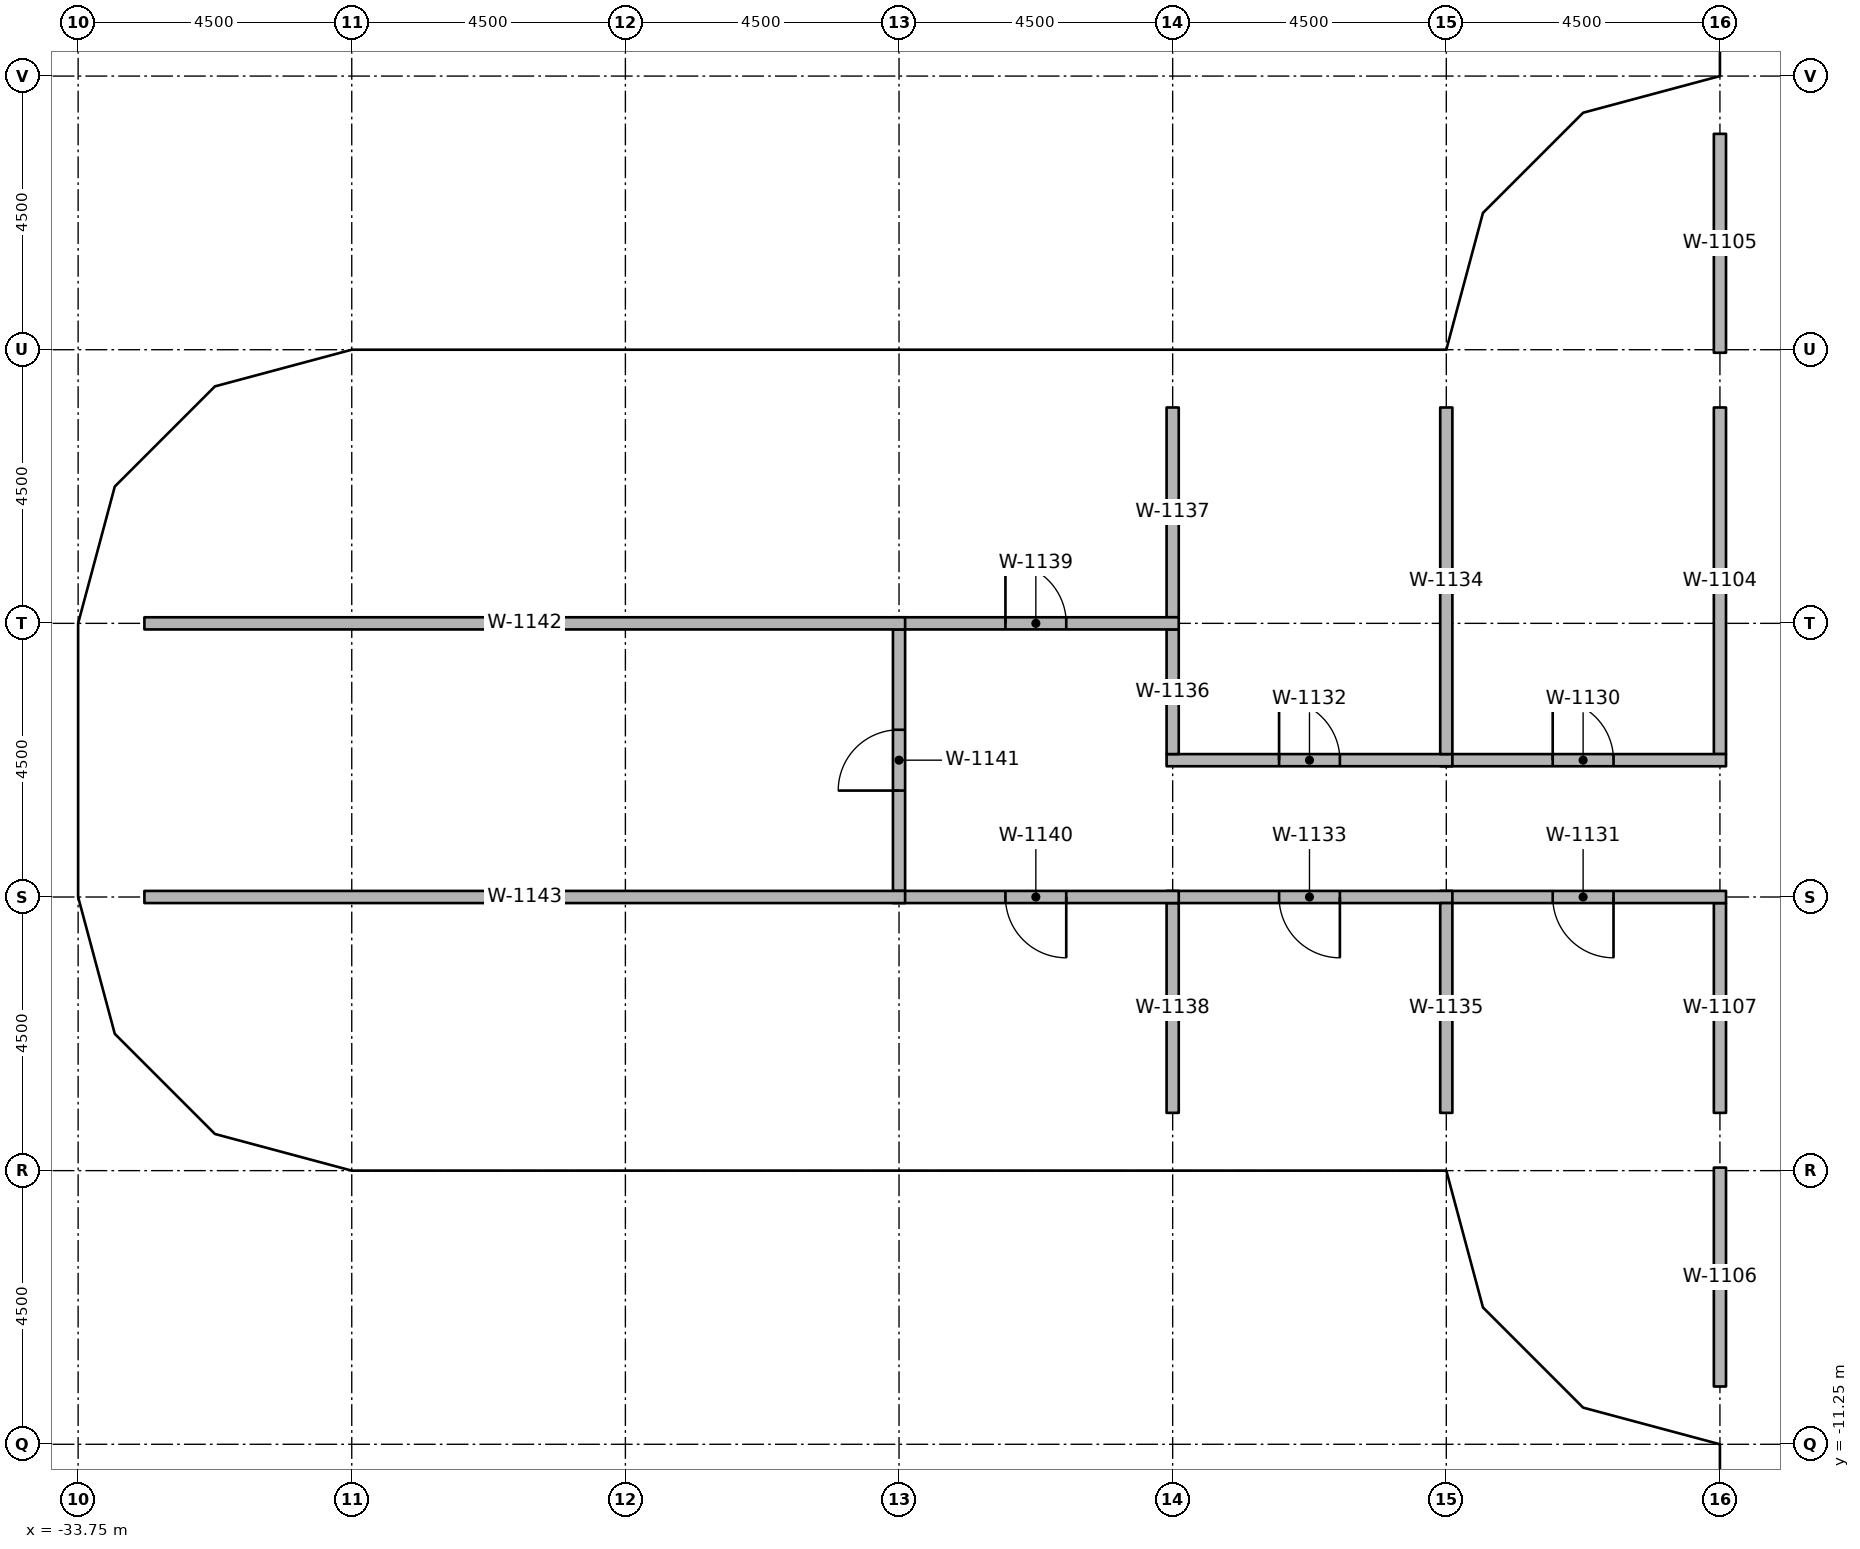
"""IFC4 building model, lengths in metres.
Left out: names, types, materials, properties, quantities, classifications, styles, units other than length and angle.
Written with IfcOpenShell. Run it as: python <this file> out.ifc"""

import sys

from ifc_helpers import new_model, si_unit, direction, frame, frame_2d, origin, origin_2d, place, context, subcontext, project, spatial, rectangle, extrude, element, fill, save


model = new_model("IFC4")
c1 = context("Model", 3, precision=1e-05, world=origin(), true_north=direction((0.0, 1.0)))
c2 = subcontext(c1, "Body", "Model", "MODEL_VIEW")
j1 = project(units=[si_unit("LENGTHUNIT", "METRE"), si_unit("PLANEANGLEUNIT", "RADIAN")], contexts=[c1])
p1 = place(None, origin())
s1 = spatial("IfcSite", under=j1, at=p1, CompositionType="ELEMENT")
p2 = place(p1, origin())
s2 = spatial("IfcBuilding", under=s1, at=p2, CompositionType="ELEMENT")
p3 = place(p2, frame((0.0, 0.0, 124.6)))
s3 = spatial("IfcBuildingStorey", under=s2, at=p3, CompositionType="ELEMENT", Elevation=124.6)
for number, where, z_axis, x_axis in (
    (1, (-33.11, -2.25, 0.0), (0.0, 0.0, 1.0), (1.0, 0.0, 0.0)),
    (2, (-33.11, 2.25, 0.0), (0.0, 0.0, 1.0), (1.0, 0.0, 0.0)),
    (3, (-28.908, -5.475, 0.0), (0.0, 0.0, 1.0), (1.0, 0.0, 0.0)),
    (4, (-28.908, 5.475, 0.0), (0.0, 0.0, 1.0), (1.0, 0.0, 0.0)),
    (5, (-24.75, -6.25, 0.0), (0.0, 0.0, 1.0), (1.0, 0.0, 0.0)),
    (6, (-24.75, 6.25, 0.0), (0.0, 0.0, 1.0), (1.0, 0.0, 0.0)),
    (7, (-20.25, -6.11, 0.0), (0.0, 0.0, 1.0), (1.0, 0.0, 0.0)),
    (8, (-20.25, 6.11, 0.0), (0.0, 0.0, 1.0), (1.0, 0.0, 0.0)),
    (9, (-15.75, -6.25, 0.0), (0.0, 0.0, 1.0), (1.0, 0.0, 0.0)),
    (10, (-15.75, 6.25, 0.0), (0.0, 0.0, 1.0), (1.0, 0.0, 0.0)),
    (11, (-10.75, -6.25, 0.0), (0.0, 0.0, 1.0), (1.0, 0.0, 0.0)),
    (12, (-10.75, 6.25, 0.0), (0.0, 0.0, 1.0), (1.0, 0.0, 0.0)),
    (13, (-6.25, -10.75, 0.0), (0.0, 0.0, 1.0), (1.0, 0.0, 0.0)),
    (14, (-6.25, -6.25, 0.0), (0.0, 0.0, 1.0), (1.0, 0.0, 0.0)),
    (15, (-6.25, 6.25, 0.0), (0.0, 0.0, 1.0), (1.0, 0.0, 0.0)),
    (16, (-6.25, 10.75, 0.0), (0.0, 0.0, 1.0), (1.0, 0.0, 0.0)),
):
    element("IfcColumn", number, at=place(p3, frame(where, z_axis=z_axis, x_axis=x_axis)), inside=s3, PredefinedType="COLUMN", context=c2, shape_type="SweptSolid", body=[
        extrude(rectangle(XDim=0.9, YDim=0.9, at=origin_2d()), origin(), (0.0, 0.0, 1.0), 3.65),
    ])
p4 = place(p3, frame((-6.75, 0.1, 0.0), z_axis=(0.0, 0.0, 1.0), x_axis=(0.0, 1.0, 0.0)))
e17 = element("IfcWall", 17, at=p4, inside=s3, PredefinedType="PARTITIONING", context=c2, shape_type="SweptSolid", body=[
    extrude(rectangle(XDim=5.7, YDim=0.2, at=frame_2d((2.85, 0.0))), origin(), (0.0, 0.0, 1.0), 2.738),
])
for number, where, z_axis, x_axis in (
    (18, (-6.75, 6.7, 0.0), (0.0, 0.0, 1.0), (0.0, 1.0, 0.0)),
    (19, (-6.75, -10.3, 0.0), (0.0, 0.0, 1.0), (0.0, 1.0, 0.0)),
):
    element("IfcWall", number, at=place(p3, frame(where, z_axis=z_axis, x_axis=x_axis)), inside=s3, PredefinedType="PARTITIONING", context=c2, shape_type="SweptSolid", body=[
        extrude(rectangle(XDim=3.6, YDim=0.2, at=frame_2d((1.8, 0.0))), origin(), (0.0, 0.0, 1.0), 2.738),
    ])
p5 = place(p3, frame((-6.75, -5.8, 0.0), z_axis=(0.0, 0.0, 1.0), x_axis=(0.0, 1.0, 0.0)))
e20 = element("IfcWall", 20, at=p5, inside=s3, PredefinedType="PARTITIONING", context=c2, shape_type="SweptSolid", body=[
    extrude(rectangle(XDim=3.45, YDim=0.2, at=frame_2d((1.725, 0.0))), origin(), (0.0, 0.0, 1.0), 2.738),
])
p6 = place(p3, frame((-11.35, 0.0, 0.0), z_axis=(0.0, 0.0, 1.0), x_axis=(1.0, 0.0, 0.0)))
e21 = element("IfcWall", 21, at=p6, inside=s3, PredefinedType="PARTITIONING", context=c2, shape_type="SweptSolid", body=[
    extrude(rectangle(XDim=4.7, YDim=0.2, at=frame_2d((2.35, 0.0))), origin(), (0.0, 0.0, 1.0), 2.738),
])
p7 = place(p6, frame((1.85, 0.0, 0.0)))
e22 = element("IfcOpeningElement", 22, at=p7, cuts=e21, PredefinedType="OPENING", context=c2, shape_type="SweptSolid", body=[
    extrude(rectangle(XDim=1.0, YDim=2.1, at=frame_2d((0.5, 1.05))), frame((0.0, 0.11, 0.0), z_axis=(0.0, -1.0, 0.0), x_axis=(1.0, 0.0, 0.0)), (0.0, 0.0, 1.0), 0.22),
])
p8 = place(p3, frame((-6.65, -2.25, 0.0), z_axis=(0.0, 0.0, 1.0), x_axis=(-1.0, 0.0, 0.0)))
e23 = element("IfcWall", 23, at=p8, inside=s3, PredefinedType="PARTITIONING", context=c2, shape_type="SweptSolid", body=[
    extrude(rectangle(XDim=4.7, YDim=0.2, at=frame_2d((2.35, 0.0))), origin(), (0.0, 0.0, 1.0), 2.738),
])
p9 = place(p8, frame((1.85, 0.0, 0.0)))
e24 = element("IfcOpeningElement", 24, at=p9, cuts=e23, PredefinedType="OPENING", context=c2, shape_type="SweptSolid", body=[
    extrude(rectangle(XDim=1.0, YDim=2.1, at=frame_2d((0.5, 1.05))), frame((0.0, 0.11, 0.0), z_axis=(0.0, -1.0, 0.0), x_axis=(1.0, 0.0, 0.0)), (0.0, 0.0, 1.0), 0.22),
])
p10 = place(p3, frame((-15.85, 0.0, 0.0), z_axis=(0.0, 0.0, 1.0), x_axis=(1.0, 0.0, 0.0)))
e25 = element("IfcWall", 25, at=p10, inside=s3, PredefinedType="PARTITIONING", context=c2, shape_type="SweptSolid", body=[
    extrude(rectangle(XDim=4.7, YDim=0.2, at=frame_2d((2.35, 0.0))), origin(), (0.0, 0.0, 1.0), 2.738),
])
p11 = place(p10, frame((1.85, 0.0, 0.0)))
e26 = element("IfcOpeningElement", 26, at=p11, cuts=e25, PredefinedType="OPENING", context=c2, shape_type="SweptSolid", body=[
    extrude(rectangle(XDim=1.0, YDim=2.1, at=frame_2d((0.5, 1.05))), frame((0.0, 0.11, 0.0), z_axis=(0.0, -1.0, 0.0), x_axis=(1.0, 0.0, 0.0)), (0.0, 0.0, 1.0), 0.22),
])
p12 = place(p3, frame((-11.15, -2.25, 0.0), z_axis=(0.0, 0.0, 1.0), x_axis=(-1.0, 0.0, 0.0)))
e27 = element("IfcWall", 27, at=p12, inside=s3, PredefinedType="PARTITIONING", context=c2, shape_type="SweptSolid", body=[
    extrude(rectangle(XDim=4.7, YDim=0.2, at=frame_2d((2.35, 0.0))), origin(), (0.0, 0.0, 1.0), 2.738),
])
p13 = place(p12, frame((1.85, 0.0, 0.0)))
e28 = element("IfcOpeningElement", 28, at=p13, cuts=e27, PredefinedType="OPENING", context=c2, shape_type="SweptSolid", body=[
    extrude(rectangle(XDim=1.0, YDim=2.1, at=frame_2d((0.5, 1.05))), frame((0.0, 0.11, 0.0), z_axis=(0.0, -1.0, 0.0), x_axis=(1.0, 0.0, 0.0)), (0.0, 0.0, 1.0), 0.22),
])
p14 = place(p3, frame((-11.25, 0.1, 0.0), z_axis=(0.0, 0.0, 1.0), x_axis=(0.0, 1.0, 0.0)))
e29 = element("IfcWall", 29, at=p14, inside=s3, PredefinedType="PARTITIONING", context=c2, shape_type="SweptSolid", body=[
    extrude(rectangle(XDim=5.7, YDim=0.2, at=frame_2d((2.85, 0.0))), origin(), (0.0, 0.0, 1.0), 2.738),
])
p15 = place(p3, frame((-11.25, -5.8, 0.0), z_axis=(0.0, 0.0, 1.0), x_axis=(0.0, 1.0, 0.0)))
e30 = element("IfcWall", 30, at=p15, inside=s3, PredefinedType="PARTITIONING", context=c2, shape_type="SweptSolid", body=[
    extrude(rectangle(XDim=3.45, YDim=0.2, at=frame_2d((1.725, 0.0))), origin(), (0.0, 0.0, 1.0), 2.738),
])
p16 = place(p3, frame((-15.75, 0.1, 0.0), z_axis=(0.0, 0.0, 1.0), x_axis=(0.0, 1.0, 0.0)))
e31 = element("IfcWall", 31, at=p16, inside=s3, PredefinedType="PARTITIONING", context=c2, shape_type="SweptSolid", body=[
    extrude(rectangle(XDim=2.05, YDim=0.2, at=frame_2d((1.025, 0.0))), origin(), (0.0, 0.0, 1.0), 2.738),
])
for number, where, z_axis, x_axis in (
    (32, (-15.75, 2.35, 0.0), (0.0, 0.0, 1.0), (0.0, 1.0, 0.0)),
    (33, (-15.75, -5.8, 0.0), (0.0, 0.0, 1.0), (0.0, 1.0, 0.0)),
):
    element("IfcWall", number, at=place(p3, frame(where, z_axis=z_axis, x_axis=x_axis)), inside=s3, PredefinedType="PARTITIONING", context=c2, shape_type="SweptSolid", body=[
        extrude(rectangle(XDim=3.45, YDim=0.2, at=frame_2d((1.725, 0.0))), origin(), (0.0, 0.0, 1.0), 2.738),
    ])
p17 = place(p3, frame((-20.35, 2.25, 0.0), z_axis=(0.0, 0.0, 1.0), x_axis=(1.0, 0.0, 0.0)))
e34 = element("IfcWall", 34, at=p17, inside=s3, PredefinedType="PARTITIONING", context=c2, shape_type="SweptSolid", body=[
    extrude(rectangle(XDim=4.7, YDim=0.2, at=frame_2d((2.35, 0.0))), origin(), (0.0, 0.0, 1.0), 2.738),
])
p18 = place(p17, frame((1.85, 0.0, 0.0)))
e35 = element("IfcOpeningElement", 35, at=p18, cuts=e34, PredefinedType="OPENING", context=c2, shape_type="SweptSolid", body=[
    extrude(rectangle(XDim=1.0, YDim=2.1, at=frame_2d((0.5, 1.05))), frame((0.0, 0.11, 0.0), z_axis=(0.0, -1.0, 0.0), x_axis=(1.0, 0.0, 0.0)), (0.0, 0.0, 1.0), 0.22),
])
p19 = place(p3, frame((-15.65, -2.25, 0.0), z_axis=(0.0, 0.0, 1.0), x_axis=(-1.0, 0.0, 0.0)))
e36 = element("IfcWall", 36, at=p19, inside=s3, PredefinedType="PARTITIONING", context=c2, shape_type="SweptSolid", body=[
    extrude(rectangle(XDim=4.7, YDim=0.2, at=frame_2d((2.35, 0.0))), origin(), (0.0, 0.0, 1.0), 2.738),
])
p20 = place(p19, frame((1.85, 0.0, 0.0)))
e37 = element("IfcOpeningElement", 37, at=p20, cuts=e36, PredefinedType="OPENING", context=c2, shape_type="SweptSolid", body=[
    extrude(rectangle(XDim=1.0, YDim=2.1, at=frame_2d((0.5, 1.05))), frame((0.0, 0.11, 0.0), z_axis=(0.0, -1.0, 0.0), x_axis=(1.0, 0.0, 0.0)), (0.0, 0.0, 1.0), 0.22),
])
p21 = place(p3, frame((-20.25, -2.15, 0.0), z_axis=(0.0, 0.0, 1.0), x_axis=(0.0, 1.0, 0.0)))
e38 = element("IfcWall", 38, at=p21, inside=s3, PredefinedType="PARTITIONING", context=c2, shape_type="SweptSolid", body=[
    extrude(rectangle(XDim=4.3, YDim=0.2, at=frame_2d((2.15, 0.0))), origin(), (0.0, 0.0, 1.0), 2.738),
])
p22 = place(p21, frame((1.65, 0.0, 0.0)))
e39 = element("IfcOpeningElement", 39, at=p22, cuts=e38, PredefinedType="OPENING", context=c2, shape_type="SweptSolid", body=[
    extrude(rectangle(XDim=1.0, YDim=2.1, at=frame_2d((0.5, 1.05))), frame((0.0, 0.11, 0.0), z_axis=(0.0, -1.0, 0.0), x_axis=(1.0, 0.0, 0.0)), (0.0, 0.0, 1.0), 0.22),
])
for number, where, z_axis, x_axis in (
    (40, (-32.66, 2.25, 0.0), (0.0, 0.0, 1.0), (1.0, 0.0, 0.0)),
    (41, (-32.66, -2.25, 0.0), (0.0, 0.0, 1.0), (1.0, 0.0, 0.0)),
):
    element("IfcWall", number, at=place(p3, frame(where, z_axis=z_axis, x_axis=x_axis)), inside=s3, PredefinedType="PARTITIONING", context=c2, shape_type="SweptSolid", body=[
        extrude(rectangle(XDim=12.51, YDim=0.2, at=frame_2d((6.255, 0.0))), origin(), (0.0, 0.0, 1.0), 2.738),
    ])
p23 = place(p22, origin())
e42 = element("IfcDoor", 42, at=p23, inside=s3, OperationType="SINGLE_SWING_RIGHT", PredefinedType="DOOR", context=c2, shape_type="SweptSolid", body=[
    extrude(rectangle(XDim=1.0, YDim=2.1, at=frame_2d((0.5, 1.05))), frame((0.0, 0.025, 0.0), z_axis=(0.0, -1.0, 0.0), x_axis=(1.0, 0.0, 0.0)), (0.0, 0.0, 1.0), 0.05),
])
fill(e39, e42)
p24 = place(p18, origin())
e43 = element("IfcDoor", 43, at=p24, inside=s3, OperationType="SINGLE_SWING_RIGHT", PredefinedType="DOOR", context=c2, shape_type="SweptSolid", body=[
    extrude(rectangle(XDim=1.0, YDim=2.1, at=frame_2d((0.5, 1.05))), frame((0.0, 0.025, 0.0), z_axis=(0.0, -1.0, 0.0), x_axis=(1.0, 0.0, 0.0)), (0.0, 0.0, 1.0), 0.05),
])
fill(e35, e43)
p25 = place(p7, origin())
e44 = element("IfcDoor", 44, at=p25, inside=s3, OperationType="SINGLE_SWING_RIGHT", PredefinedType="DOOR", context=c2, shape_type="SweptSolid", body=[
    extrude(rectangle(XDim=1.0, YDim=2.1, at=frame_2d((0.5, 1.05))), frame((0.0, 0.025, 0.0), z_axis=(0.0, -1.0, 0.0), x_axis=(1.0, 0.0, 0.0)), (0.0, 0.0, 1.0), 0.05),
])
fill(e22, e44)
p26 = place(p11, origin())
e45 = element("IfcDoor", 45, at=p26, inside=s3, OperationType="SINGLE_SWING_RIGHT", PredefinedType="DOOR", context=c2, shape_type="SweptSolid", body=[
    extrude(rectangle(XDim=1.0, YDim=2.1, at=frame_2d((0.5, 1.05))), frame((0.0, 0.025, 0.0), z_axis=(0.0, -1.0, 0.0), x_axis=(1.0, 0.0, 0.0)), (0.0, 0.0, 1.0), 0.05),
])
fill(e26, e45)
p27 = place(p20, origin())
e46 = element("IfcDoor", 46, at=p27, inside=s3, OperationType="SINGLE_SWING_LEFT", PredefinedType="DOOR", context=c2, shape_type="SweptSolid", body=[
    extrude(rectangle(XDim=1.0, YDim=2.1, at=frame_2d((0.5, 1.05))), frame((0.0, 0.025, 0.0), z_axis=(0.0, -1.0, 0.0), x_axis=(1.0, 0.0, 0.0)), (0.0, 0.0, 1.0), 0.05),
])
fill(e37, e46)
p28 = place(p9, origin())
e47 = element("IfcDoor", 47, at=p28, inside=s3, OperationType="SINGLE_SWING_RIGHT", PredefinedType="DOOR", context=c2, shape_type="SweptSolid", body=[
    extrude(rectangle(XDim=1.0, YDim=2.1, at=frame_2d((0.5, 1.05))), frame((0.0, 0.025, 0.0), z_axis=(0.0, -1.0, 0.0), x_axis=(1.0, 0.0, 0.0)), (0.0, 0.0, 1.0), 0.05),
])
fill(e24, e47)
p29 = place(p13, origin())
e48 = element("IfcDoor", 48, at=p29, inside=s3, OperationType="SINGLE_SWING_RIGHT", PredefinedType="DOOR", context=c2, shape_type="SweptSolid", body=[
    extrude(rectangle(XDim=1.0, YDim=2.1, at=frame_2d((0.5, 1.05))), frame((0.0, 0.025, 0.0), z_axis=(0.0, -1.0, 0.0), x_axis=(1.0, 0.0, 0.0)), (0.0, 0.0, 1.0), 0.05),
])
fill(e28, e48)
save(model, sys.argv[1])
